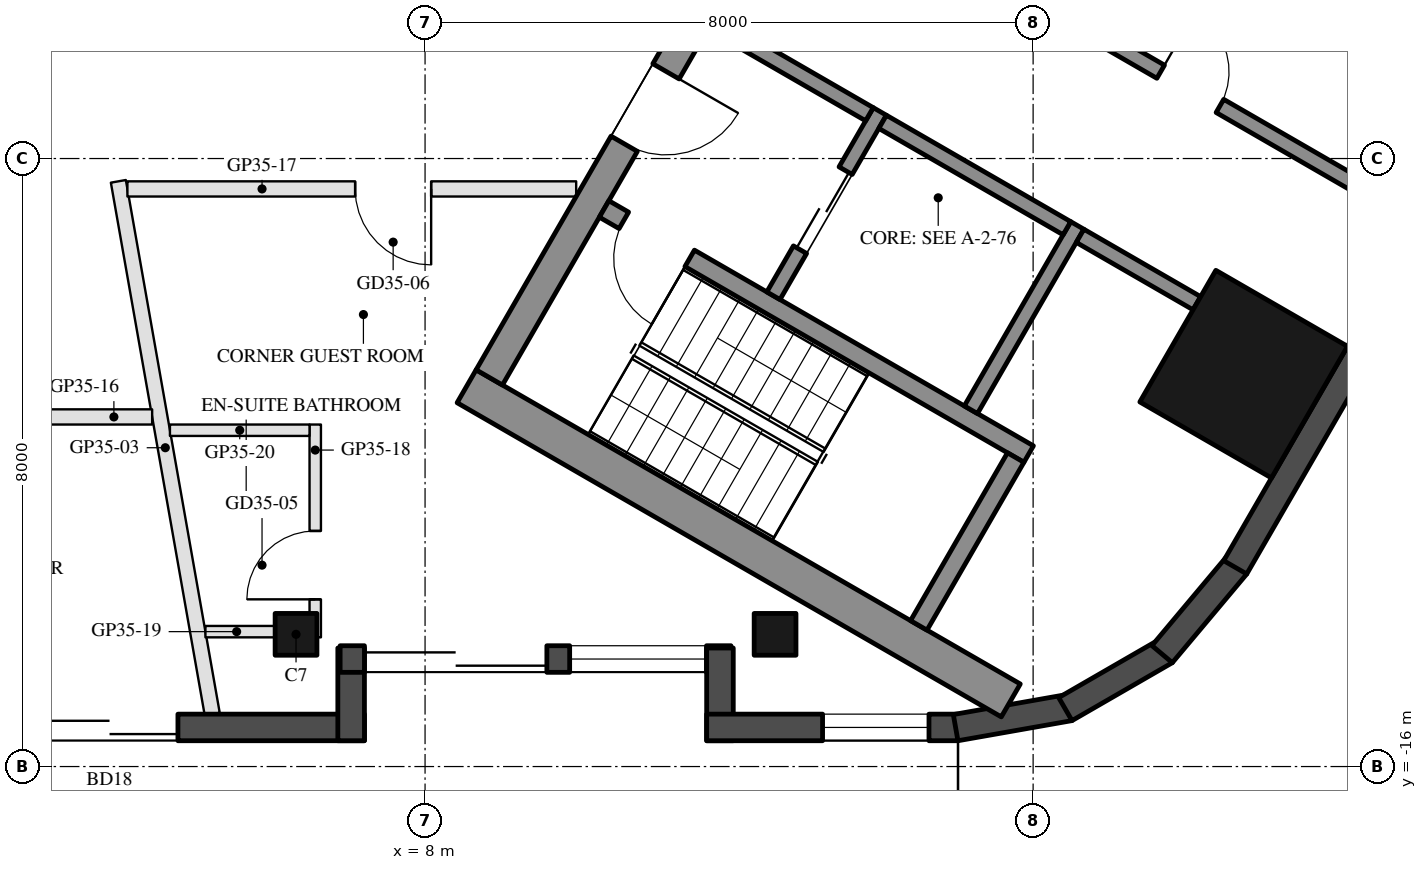
"""IFC4 building model, lengths in metres.
Left out: names, types, materials, properties, quantities, classifications, styles, units other than length and angle.
Written with IfcOpenShell. Run it as: python <this file> out.ifc"""

import sys

from ifc_helpers import new_model, si_unit, direction, frame, frame_2d, origin, origin_2d, place, context, subcontext, project, spatial, rectangle, hollow_rectangle, extrude, boolean, halfspace, element, fill, save


model = new_model("IFC4")
c1 = context("Model", 3, precision=1e-05, world=origin(), true_north=direction((0.0, 1.0)))
c2 = subcontext(c1, "Body", "Model", "MODEL_VIEW")
j1 = project(units=[si_unit("LENGTHUNIT", "METRE"), si_unit("PLANEANGLEUNIT", "RADIAN")], contexts=[c1])
p1 = place(None, origin())
s1 = spatial("IfcSite", under=j1, at=p1, CompositionType="ELEMENT")
p2 = place(p1, origin())
s2 = spatial("IfcBuilding", under=s1, at=p2, CompositionType="ELEMENT")
p3 = place(p2, frame((0.0, 0.0, 324.4)))
s3 = spatial("IfcBuildingStorey", under=s2, at=p3, CompositionType="ELEMENT", Elevation=324.4)
p4 = place(p3, frame((6.302, -14.26, 0.0), z_axis=(0.0, 0.0, 1.0), x_axis=(-1.0, 0.0, 0.0)))
e1 = element("IfcColumn", 1, at=p4, inside=s3, PredefinedType="COLUMN", context=c2, shape_type="SweptSolid", body=[
    boolean("DIFFERENCE", boolean("DIFFERENCE", extrude(hollow_rectangle(XDim=0.55, YDim=0.55, WallThickness=0.025, at=origin_2d()), origin(), (0.0, 0.0, 1.0), 3.7), halfspace(frame((0.0, 0.0, 0.034), z_axis=(0.0, 0.0, 1.0), x_axis=(1.0, 0.0, 0.0)), True)), halfspace(frame((0.0, 0.0, 3.666), z_axis=(0.0, 0.0, 1.0), x_axis=(1.0, 0.0, 0.0)), False)),
])
p5 = place(p3, frame((12.605, -14.26, 0.0), z_axis=(0.0, 0.0, 1.0), x_axis=(-1.0, 0.0, 0.0)))
e2 = element("IfcColumn", 2, at=p5, inside=s3, PredefinedType="COLUMN", context=c2, shape_type="SweptSolid", body=[
    boolean("DIFFERENCE", boolean("DIFFERENCE", extrude(hollow_rectangle(XDim=0.55, YDim=0.55, WallThickness=0.025, at=origin_2d()), origin(), (0.0, 0.0, 1.0), 3.7), halfspace(frame((0.0, 0.0, 0.04), z_axis=(0.0, 0.0, 1.0), x_axis=(1.0, 0.0, 0.0)), True)), halfspace(frame((0.0, 0.0, 3.66), z_axis=(0.0, 0.0, 1.0), x_axis=(1.0, 0.0, 0.0)), False)),
])
p6 = place(p3, frame((18.77, -10.837, 0.0), z_axis=(0.0, 0.0, 1.0), x_axis=(0.5, 0.866025403784, 0.0)))
e3 = element("IfcColumn", 3, at=p6, inside=s3, PredefinedType="COLUMN", context=c2, shape_type="SweptSolid", body=[
    boolean("DIFFERENCE", boolean("DIFFERENCE", extrude(hollow_rectangle(XDim=2.0, YDim=2.0, WallThickness=0.05, at=origin_2d()), origin(), (0.0, 0.0, 1.0), 3.7), halfspace(frame((0.0, 0.0, 0.113), z_axis=(0.0, 0.0, 1.0), x_axis=(1.0, 0.0, 0.0)), True)), halfspace(frame((0.0, 0.0, 3.587), z_axis=(0.0, 0.0, 1.0), x_axis=(1.0, 0.0, 0.0)), False)),
])
p7 = place(p3, frame((-0.9, -15.485, 0.0), z_axis=(0.0, 0.0, 1.0), x_axis=(1.0, 0.0, 0.0)))
e4 = element("IfcWall", 4, at=p7, inside=s3, PredefinedType="SOLIDWALL", context=c2, shape_type="SweptSolid", body=[
    extrude(rectangle(XDim=8.102, YDim=0.35, at=frame_2d((4.051, 0.0))), origin(), (0.0, 0.0, 1.0), 3.55),
])
p8 = place(p7, frame((3.849, 0.0, 0.0)))
e5 = element("IfcOpeningElement", 5, at=p8, cuts=e4, PredefinedType="OPENING", context=c2, shape_type="SweptSolid", body=[
    extrude(rectangle(XDim=1.8, YDim=2.4, at=frame_2d((0.9, 1.2))), frame((0.0, 0.185, 0.0), z_axis=(0.0, -1.0, 0.0), x_axis=(1.0, 0.0, 0.0)), (0.0, 0.0, 1.0), 0.37),
])
p9 = place(p7, frame((1.525, 0.0, 0.3)))
e6 = element("IfcOpeningElement", 6, at=p9, cuts=e4, PredefinedType="OPENING", context=c2, shape_type="SweptSolid", body=[
    extrude(rectangle(XDim=2.0, YDim=2.65, at=frame_2d((1.0, 1.325))), frame((0.0, 0.185, 0.0), z_axis=(0.0, -1.0, 0.0), x_axis=(1.0, 0.0, 0.0)), (0.0, 0.0, 1.0), 0.37),
])
p10 = place(p3, frame((7.027, -15.66, 0.0), z_axis=(0.0, 0.0, 1.0), x_axis=(0.0, 1.0, 0.0)))
e7 = element("IfcWall", 7, at=p10, inside=s3, PredefinedType="SOLIDWALL", context=c2, shape_type="SweptSolid", body=[
    extrude(rectangle(XDim=1.22, YDim=0.35, at=frame_2d((0.61, 0.0))), origin(), (0.0, 0.0, 1.0), 3.55),
])
p11 = place(p3, frame((6.882, -14.585, 0.0), z_axis=(0.0, 0.0, 1.0), x_axis=(1.0, 0.0, 0.0)))
e8 = element("IfcWall", 8, at=p11, inside=s3, PredefinedType="SOLIDWALL", context=c2, shape_type="SweptSolid", body=[
    extrude(rectangle(XDim=5.143, YDim=0.35, at=frame_2d((2.571, 0.0))), origin(), (0.0, 0.0, 1.0), 3.55),
])
p12 = place(p11, frame((0.32, 0.0, 0.0)))
e9 = element("IfcOpeningElement", 9, at=p12, cuts=e8, PredefinedType="OPENING", context=c2, shape_type="SweptSolid", body=[
    extrude(rectangle(XDim=2.4, YDim=2.4, at=frame_2d((1.2, 1.2))), frame((0.0, 0.185, 0.0), z_axis=(0.0, -1.0, 0.0), x_axis=(1.0, 0.0, 0.0)), (0.0, 0.0, 1.0), 0.37),
])
p13 = place(p11, frame((3.02, 0.0, 0.3)))
e10 = element("IfcOpeningElement", 10, at=p13, cuts=e8, PredefinedType="OPENING", context=c2, shape_type="SweptSolid", body=[
    extrude(rectangle(XDim=1.8, YDim=2.65, at=frame_2d((0.9, 1.325))), frame((0.0, 0.185, 0.0), z_axis=(0.0, -1.0, 0.0), x_axis=(1.0, 0.0, 0.0)), (0.0, 0.0, 1.0), 0.37),
])
p14 = place(p3, frame((11.88, -14.44, 0.0), z_axis=(0.0, 0.0, 1.0), x_axis=(0.0, -1.0, 0.0)))
e11 = element("IfcWall", 11, at=p14, inside=s3, PredefinedType="SOLIDWALL", context=c2, shape_type="SweptSolid", body=[
    extrude(rectangle(XDim=1.22, YDim=0.35, at=frame_2d((0.61, 0.0))), origin(), (0.0, 0.0, 1.0), 3.55),
])
p15 = place(p3, frame((11.705, -15.485, 0.0), z_axis=(0.0, 0.0, 1.0), x_axis=(1.0, 0.0, 0.0)))
e12 = element("IfcWall", 12, at=p15, inside=s3, PredefinedType="SOLIDWALL", context=c2, shape_type="SweptSolid", body=[
    extrude(rectangle(XDim=3.306, YDim=0.35, at=frame_2d((1.653, 0.0))), origin(), (0.0, 0.0, 1.0), 3.55),
])
p16 = place(p15, frame((1.525, 0.0, 0.3)))
e13 = element("IfcOpeningElement", 13, at=p16, cuts=e12, PredefinedType="OPENING", context=c2, shape_type="SweptSolid", body=[
    extrude(rectangle(XDim=1.4, YDim=2.65, at=frame_2d((0.7, 1.325))), frame((0.0, 0.185, 0.0), z_axis=(0.0, -1.0, 0.0), x_axis=(1.0, 0.0, 0.0)), (0.0, 0.0, 1.0), 0.37),
])
for number, where, z_axis, x_axis in (
    (14, (14.98, -15.488, 0.0), (0.0, 0.0, 1.0), (0.985, 0.174, 0.0)),
    (15, (16.424, -15.244, 0.0), (0.0, 0.0, 1.0), (0.866, 0.5, 0.0)),
):
    element("IfcWall", number, at=place(p3, frame(where, z_axis=z_axis, x_axis=x_axis)), inside=s3, PredefinedType="SOLIDWALL", context=c2, shape_type="SweptSolid", body=[
        extrude(rectangle(XDim=1.524, YDim=0.35, at=frame_2d((0.762, 0.0))), origin(), (0.0, 0.0, 1.0), 3.55),
    ])
p17 = place(p3, frame((17.697, -14.521, 0.0), z_axis=(0.0, 0.0, 1.0), x_axis=(0.642812493629, 0.766023562323, 0.0)))
e16 = element("IfcWall", 16, at=p17, inside=s3, PredefinedType="SOLIDWALL", context=c2, shape_type="SweptSolid", body=[
    extrude(rectangle(XDim=1.524, YDim=0.35, at=frame_2d((0.762, 0.0))), origin(), (0.0, 0.0, 1.0), 3.55),
])
p18 = place(p3, frame((18.659, -13.379, 0.0), z_axis=(0.0, 0.0, 1.0), x_axis=(0.500042384281, 0.866000931825, 0.0)))
e17 = element("IfcWall", 17, at=p18, inside=s3, PredefinedType="SOLIDWALL", context=c2, shape_type="SweptSolid", body=[
    extrude(rectangle(XDim=4.514, YDim=0.35, at=frame_2d((2.257, 0.0))), origin(), (0.0, 0.0, 1.0), 3.55),
])
p19 = place(p3, frame((8.547, -10.997, 0.0), z_axis=(0.0, 0.0, 1.0), x_axis=(0.866030186143, -0.49999171662, 0.0)))
e18 = element("IfcWall", 18, at=p19, inside=s3, PredefinedType="SHEAR", context=c2, shape_type="SweptSolid", body=[
    extrude(rectangle(XDim=8.267, YDim=0.5, at=frame_2d((4.134, 0.0))), origin(), (0.0, 0.0, 1.0), 3.5),
])
p20 = place(p3, frame((8.845, -10.88, 0.0), z_axis=(0.0, 0.0, 1.0), x_axis=(0.500004234368, 0.866022959057, 0.0)))
e19 = element("IfcWall", 19, at=p20, inside=s3, PredefinedType="SHEAR", context=c2, shape_type="SweptSolid", body=[
    extrude(rectangle(XDim=10.0, YDim=0.4, at=frame_2d((5.0, 0.0))), origin(), (0.0, 0.0, 1.0), 3.5),
])
p21 = place(p20, frame((3.55, 0.0, 0.0)))
e20 = element("IfcOpeningElement", 20, at=p21, cuts=e19, PredefinedType="OPENING", context=c2, shape_type="SweptSolid", body=[
    extrude(rectangle(XDim=1.1, YDim=2.1, at=frame_2d((0.55, 1.05))), frame((0.0, 0.21, 0.0), z_axis=(0.0, -1.0, 0.0), x_axis=(1.0, 0.0, 0.0)), (0.0, 0.0, 1.0), 0.42),
])
p22 = place(p20, frame((5.85, 0.0, 0.0)))
e21 = element("IfcOpeningElement", 21, at=p22, cuts=e19, PredefinedType="OPENING", context=c2, shape_type="SweptSolid", body=[
    extrude(rectangle(XDim=1.4, YDim=2.1, at=frame_2d((0.7, 1.05))), frame((0.0, 0.21, 0.0), z_axis=(0.0, -1.0, 0.0), x_axis=(1.0, 0.0, 0.0)), (0.0, 0.0, 1.0), 0.42),
])
p23 = place(p3, frame((10.356, -8.664, 0.0), z_axis=(0.0, 0.0, 1.0), x_axis=(0.866028629588, -0.499994412703, 0.0)))
e22 = element("IfcWall", 22, at=p23, inside=s3, PredefinedType="SHEAR", context=c2, shape_type="SweptSolid", body=[
    extrude(rectangle(XDim=6.45, YDim=0.25, at=frame_2d((3.225, 0.0))), origin(), (0.0, 0.0, 1.0), 3.5),
])
p24 = place(p23, frame((0.3, 0.0, 0.0)))
e23 = element("IfcOpeningElement", 23, at=p24, cuts=e22, PredefinedType="OPENING", context=c2, shape_type="SweptSolid", body=[
    extrude(rectangle(XDim=1.0, YDim=2.1, at=frame_2d((0.5, 1.05))), frame((0.0, 0.135, 0.0), z_axis=(0.0, -1.0, 0.0), x_axis=(1.0, 0.0, 0.0)), (0.0, 0.0, 1.0), 0.27),
])
p25 = place(p3, frame((14.496, -14.143, 0.0), z_axis=(0.0, 0.0, 1.0), x_axis=(0.500062241894, 0.865989465428, 0.0)))
e24 = element("IfcWall", 24, at=p25, inside=s3, PredefinedType="SHEAR", context=c2, shape_type="SweptSolid", body=[
    extrude(rectangle(XDim=2.55, YDim=0.25, at=frame_2d((1.275, 0.0))), origin(), (0.0, 0.0, 1.0), 3.5),
])
p26 = place(p3, frame((15.181, -11.305, 0.0), z_axis=(0.0, 0.0, 1.0), x_axis=(0.49994636267, 0.866056369097, 0.0)))
e25 = element("IfcWall", 25, at=p26, inside=s3, PredefinedType="SHEAR", context=c2, shape_type="SweptSolid", body=[
    extrude(rectangle(XDim=2.8, YDim=0.2, at=frame_2d((1.4, 0.0))), origin(), (0.0, 0.0, 1.0), 3.5),
])
p27 = place(p3, frame((12.583, -9.805, 0.0), z_axis=(0.0, 0.0, 1.0), x_axis=(0.49994636267, 0.866056369097, 0.0)))
e26 = element("IfcWall", 26, at=p27, inside=s3, PredefinedType="SHEAR", context=c2, shape_type="SweptSolid", body=[
    extrude(rectangle(XDim=2.8, YDim=0.2, at=frame_2d((1.4, 0.0))), origin(), (0.0, 0.0, 1.0), 3.5),
])
p28 = place(p27, frame((0.7, 0.0, 0.0)))
e27 = element("IfcOpeningElement", 27, at=p28, cuts=e26, PredefinedType="OPENING", context=c2, shape_type="SweptSolid", body=[
    extrude(rectangle(XDim=1.2, YDim=2.1, at=frame_2d((0.6, 1.05))), frame((0.0, 0.11, 0.0), z_axis=(0.0, -1.0, 0.0), x_axis=(1.0, 0.0, 0.0)), (0.0, 0.0, 1.0), 0.22),
])
p29 = place(p3, frame((11.768, -6.217, 0.0), z_axis=(0.0, 0.0, 1.0), x_axis=(0.866050077142, -0.499957262057, 0.0)))
e28 = element("IfcWall", 28, at=p29, inside=s3, PredefinedType="SHEAR", context=c2, shape_type="SweptSolid", body=[
    extrude(rectangle(XDim=2.4, YDim=0.2, at=frame_2d((1.2, 0.0))), origin(), (0.0, 0.0, 1.0), 3.5),
])
p30 = place(p3, frame((14.02, -7.517, 0.0), z_axis=(0.0, 0.0, 1.0), x_axis=(0.866034573852, -0.49998411664, 0.0)))
e29 = element("IfcWall", 29, at=p30, inside=s3, PredefinedType="SHEAR", context=c2, shape_type="SweptSolid", body=[
    extrude(rectangle(XDim=2.8, YDim=0.2, at=frame_2d((1.4, 0.0))), origin(), (0.0, 0.0, 1.0), 3.5),
])
p31 = place(p3, frame((12.968, -4.138, 0.0), z_axis=(0.0, 0.0, 1.0), x_axis=(0.866022923061, -0.500004296715, 0.0)))
e30 = element("IfcWall", 30, at=p31, inside=s3, PredefinedType="SHEAR", context=c2, shape_type="SweptSolid", body=[
    extrude(rectangle(XDim=9.273, YDim=0.2, at=frame_2d((4.636, 0.0))), origin(), (0.0, 0.0, 1.0), 3.5),
])
p32 = place(p31, frame((0.62, 0.0, 0.0)))
e31 = element("IfcOpeningElement", 31, at=p32, cuts=e30, PredefinedType="OPENING", context=c2, shape_type="SweptSolid", body=[
    extrude(rectangle(XDim=1.1, YDim=2.1, at=frame_2d((0.55, 1.05))), frame((0.0, 0.11, 0.0), z_axis=(0.0, -1.0, 0.0), x_axis=(1.0, 0.0, 0.0)), (0.0, 0.0, 1.0), 0.22),
])
p33 = place(p31, frame((5.439, 0.0, 0.0)))
e32 = element("IfcOpeningElement", 32, at=p33, cuts=e30, PredefinedType="OPENING", context=c2, shape_type="SweptSolid", body=[
    extrude(rectangle(XDim=0.9, YDim=2.1, at=frame_2d((0.45, 1.05))), frame((0.0, 0.11, 0.0), z_axis=(0.0, -1.0, 0.0), x_axis=(1.0, 0.0, 0.0)), (0.0, 0.0, 1.0), 0.22),
])
p34 = place(p3, frame((16.618, -9.017, 0.0), z_axis=(0.0, 0.0, 1.0), x_axis=(0.866066400931, -0.499928984136, 0.0)))
e33 = element("IfcWall", 33, at=p34, inside=s3, PredefinedType="SHEAR", context=c2, shape_type="SweptSolid", body=[
    extrude(rectangle(XDim=1.774, YDim=0.2, at=frame_2d((0.887, 0.0))), origin(), (0.0, 0.0, 1.0), 3.5),
])
p35 = place(p3, frame((5.2, -15.31, 0.0), z_axis=(0.0, 0.0, 1.0), x_axis=(-0.173513360602, 0.984831515384, 0.0)))
e34 = element("IfcWall", 34, at=p35, inside=s3, PredefinedType="PARTITIONING", context=c2, shape_type="SweptSolid", body=[
    extrude(rectangle(XDim=7.118, YDim=0.2, at=frame_2d((3.559, 0.0))), origin(), (0.0, 0.0, 1.0), 3.1),
])
p36 = place(p3, frame((4.409, -11.4, 0.0), z_axis=(0.0, 0.0, 1.0), x_axis=(-1.0, 0.0, 0.0)))
e35 = element("IfcWall", 35, at=p36, inside=s3, PredefinedType="PARTITIONING", context=c2, shape_type="SweptSolid", body=[
    extrude(rectangle(XDim=4.195, YDim=0.2, at=frame_2d((2.097, 0.0))), origin(), (0.0, 0.0, 1.0), 3.15),
])
p37 = place(p36, frame((1.597, 0.0, 0.0)))
e36 = element("IfcOpeningElement", 36, at=p37, cuts=e35, PredefinedType="OPENING", context=c2, shape_type="SweptSolid", body=[
    extrude(rectangle(XDim=1.0, YDim=2.1, at=frame_2d((0.5, 1.05))), frame((0.0, 0.11, 0.0), z_axis=(0.0, -1.0, 0.0), x_axis=(1.0, 0.0, 0.0)), (0.0, 0.0, 1.0), 0.22),
])
p38 = place(p3, frame((9.988, -8.4, 0.0), z_axis=(0.0, 0.0, 1.0), x_axis=(-1.0, 0.0, 0.0)))
e37 = element("IfcWall", 37, at=p38, inside=s3, PredefinedType="PARTITIONING", context=c2, shape_type="SweptSolid", body=[
    extrude(rectangle(XDim=5.904, YDim=0.2, at=frame_2d((2.952, 0.0))), origin(), (0.0, 0.0, 1.0), 3.15),
])
p39 = place(p38, frame((1.908, 0.0, 0.0)))
e38 = element("IfcOpeningElement", 38, at=p39, cuts=e37, PredefinedType="OPENING", context=c2, shape_type="SweptSolid", body=[
    extrude(rectangle(XDim=1.0, YDim=2.1, at=frame_2d((0.5, 1.05))), frame((0.0, 0.11, 0.0), z_axis=(0.0, -1.0, 0.0), x_axis=(1.0, 0.0, 0.0)), (0.0, 0.0, 1.0), 0.22),
])
p40 = place(p3, frame((6.555, -14.3, 0.0), z_axis=(0.0, 0.0, 1.0), x_axis=(0.0, 1.0, 0.0)))
e39 = element("IfcWall", 39, at=p40, inside=s3, PredefinedType="PARTITIONING", context=c2, shape_type="SweptSolid", body=[
    extrude(rectangle(XDim=2.8, YDim=0.15, at=frame_2d((1.4, 0.0))), origin(), (0.0, 0.0, 1.0), 3.1),
])
p41 = place(p40, frame((0.5, 0.0, 0.0)))
e40 = element("IfcOpeningElement", 40, at=p41, cuts=e39, PredefinedType="OPENING", context=c2, shape_type="SweptSolid", body=[
    extrude(rectangle(XDim=0.9, YDim=2.1, at=frame_2d((0.45, 1.05))), frame((0.0, 0.085, 0.0), z_axis=(0.0, -1.0, 0.0), x_axis=(1.0, 0.0, 0.0)), (0.0, 0.0, 1.0), 0.17),
])
p42 = place(p3, frame((5.11, -14.225, 0.0), z_axis=(0.0, 0.0, 1.0), x_axis=(1.0, 0.0, 0.0)))
e41 = element("IfcWall", 41, at=p42, inside=s3, PredefinedType="PARTITIONING", context=c2, shape_type="SweptSolid", body=[
    extrude(rectangle(XDim=1.37, YDim=0.15, at=frame_2d((0.685, 0.0))), origin(), (0.0, 0.0, 1.0), 3.1),
])
p43 = place(p3, frame((4.643, -11.575, 0.0), z_axis=(0.0, 0.0, 1.0), x_axis=(1.0, 0.0, 0.0)))
e42 = element("IfcWall", 42, at=p43, inside=s3, PredefinedType="PARTITIONING", context=c2, shape_type="SweptSolid", body=[
    extrude(rectangle(XDim=1.837, YDim=0.15, at=frame_2d((0.918, 0.0))), origin(), (0.0, 0.0, 1.0), 3.15),
])
p44 = place(p8, frame((1.8, 0.0, 0.0), z_axis=(0.0, 0.0, 1.0), x_axis=(-1.0, 0.0, 0.0)))
e43 = element("IfcDoor", 43, at=p44, inside=s3, OperationType="SLIDING_TO_LEFT", PredefinedType="DOOR", context=c2, shape_type="SweptSolid", body=[
    extrude(rectangle(XDim=1.8, YDim=2.4, at=frame_2d((0.9, 1.2))), frame((0.0, 0.025, 0.0), z_axis=(0.0, -1.0, 0.0), x_axis=(1.0, 0.0, 0.0)), (0.0, 0.0, 1.0), 0.05),
])
fill(e5, e43)
p45 = place(p12, frame((2.4, 0.0, 0.0), z_axis=(0.0, 0.0, 1.0), x_axis=(-1.0, 0.0, 0.0)))
e44 = element("IfcDoor", 44, at=p45, inside=s3, OperationType="SLIDING_TO_LEFT", PredefinedType="DOOR", context=c2, shape_type="SweptSolid", body=[
    extrude(rectangle(XDim=2.4, YDim=2.4, at=frame_2d((1.2, 1.2))), frame((0.0, 0.025, 0.0), z_axis=(0.0, -1.0, 0.0), x_axis=(1.0, 0.0, 0.0)), (0.0, 0.0, 1.0), 0.05),
])
fill(e9, e44)
p46 = place(p13, origin())
e45 = element("IfcWindow", 45, at=p46, inside=s3, PartitioningType="SINGLE_PANEL", PredefinedType="WINDOW", context=c2, shape_type="SweptSolid", body=[
    extrude(rectangle(XDim=1.8, YDim=2.65, at=frame_2d((0.9, 1.325))), frame((0.0, 0.03, 0.0), z_axis=(0.0, -1.0, 0.0), x_axis=(1.0, 0.0, 0.0)), (0.0, 0.0, 1.0), 0.06),
])
fill(e10, e45)
p47 = place(p16, origin())
e46 = element("IfcWindow", 46, at=p47, inside=s3, PartitioningType="SINGLE_PANEL", PredefinedType="WINDOW", context=c2, shape_type="SweptSolid", body=[
    extrude(rectangle(XDim=1.4, YDim=2.65, at=frame_2d((0.7, 1.325))), frame((0.0, 0.03, 0.0), z_axis=(0.0, -1.0, 0.0), x_axis=(1.0, 0.0, 0.0)), (0.0, 0.0, 1.0), 0.06),
])
fill(e13, e46)
p48 = place(p28, origin())
e47 = element("IfcDoor", 47, at=p48, inside=s3, OperationType="DOUBLE_DOOR_SLIDING", PredefinedType="DOOR", context=c2, shape_type="SweptSolid", body=[
    extrude(rectangle(XDim=1.2, YDim=2.1, at=frame_2d((0.6, 1.05))), frame((0.0, 0.025, 0.0), z_axis=(0.0, -1.0, 0.0), x_axis=(1.0, 0.0, 0.0)), (0.0, 0.0, 1.0), 0.05),
])
fill(e27, e47)
p49 = place(p33, origin())
e48 = element("IfcDoor", 48, at=p49, inside=s3, OperationType="SINGLE_SWING_LEFT", PredefinedType="DOOR", context=c2, shape_type="SweptSolid", body=[
    extrude(rectangle(XDim=0.9, YDim=2.1, at=frame_2d((0.45, 1.05))), frame((0.0, 0.025, 0.0), z_axis=(0.0, -1.0, 0.0), x_axis=(1.0, 0.0, 0.0)), (0.0, 0.0, 1.0), 0.05),
])
fill(e32, e48)
p50 = place(p21, frame((1.1, 0.0, 0.0), z_axis=(0.0, 0.0, 1.0), x_axis=(-1.0, 0.0, 0.0)))
e49 = element("IfcDoor", 49, at=p50, inside=s3, OperationType="SINGLE_SWING_LEFT", PredefinedType="DOOR", context=c2, shape_type="SweptSolid", body=[
    extrude(rectangle(XDim=1.1, YDim=2.1, at=frame_2d((0.55, 1.05))), frame((0.0, 0.025, 0.0), z_axis=(0.0, -1.0, 0.0), x_axis=(1.0, 0.0, 0.0)), (0.0, 0.0, 1.0), 0.05),
])
fill(e20, e49)
p51 = place(p24, frame((1.0, 0.0, 0.0), z_axis=(0.0, 0.0, 1.0), x_axis=(-1.0, 0.0, 0.0)))
e50 = element("IfcDoor", 50, at=p51, inside=s3, OperationType="SINGLE_SWING_LEFT", PredefinedType="DOOR", context=c2, shape_type="SweptSolid", body=[
    extrude(rectangle(XDim=1.0, YDim=2.1, at=frame_2d((0.5, 1.05))), frame((0.0, 0.025, 0.0), z_axis=(0.0, -1.0, 0.0), x_axis=(1.0, 0.0, 0.0)), (0.0, 0.0, 1.0), 0.05),
])
fill(e23, e50)
p52 = place(p41, origin())
e51 = element("IfcDoor", 51, at=p52, inside=s3, OperationType="SINGLE_SWING_LEFT", PredefinedType="DOOR", context=c2, shape_type="SweptSolid", body=[
    extrude(rectangle(XDim=0.9, YDim=2.1, at=frame_2d((0.45, 1.05))), frame((0.0, 0.025, 0.0), z_axis=(0.0, -1.0, 0.0), x_axis=(1.0, 0.0, 0.0)), (0.0, 0.0, 1.0), 0.05),
])
fill(e40, e51)
p53 = place(p39, origin())
e52 = element("IfcDoor", 52, at=p53, inside=s3, OperationType="SINGLE_SWING_LEFT", PredefinedType="DOOR", context=c2, shape_type="SweptSolid", body=[
    extrude(rectangle(XDim=1.0, YDim=2.1, at=frame_2d((0.5, 1.05))), frame((0.0, 0.025, 0.0), z_axis=(0.0, -1.0, 0.0), x_axis=(1.0, 0.0, 0.0)), (0.0, 0.0, 1.0), 0.05),
])
fill(e38, e52)
save(model, sys.argv[1])
